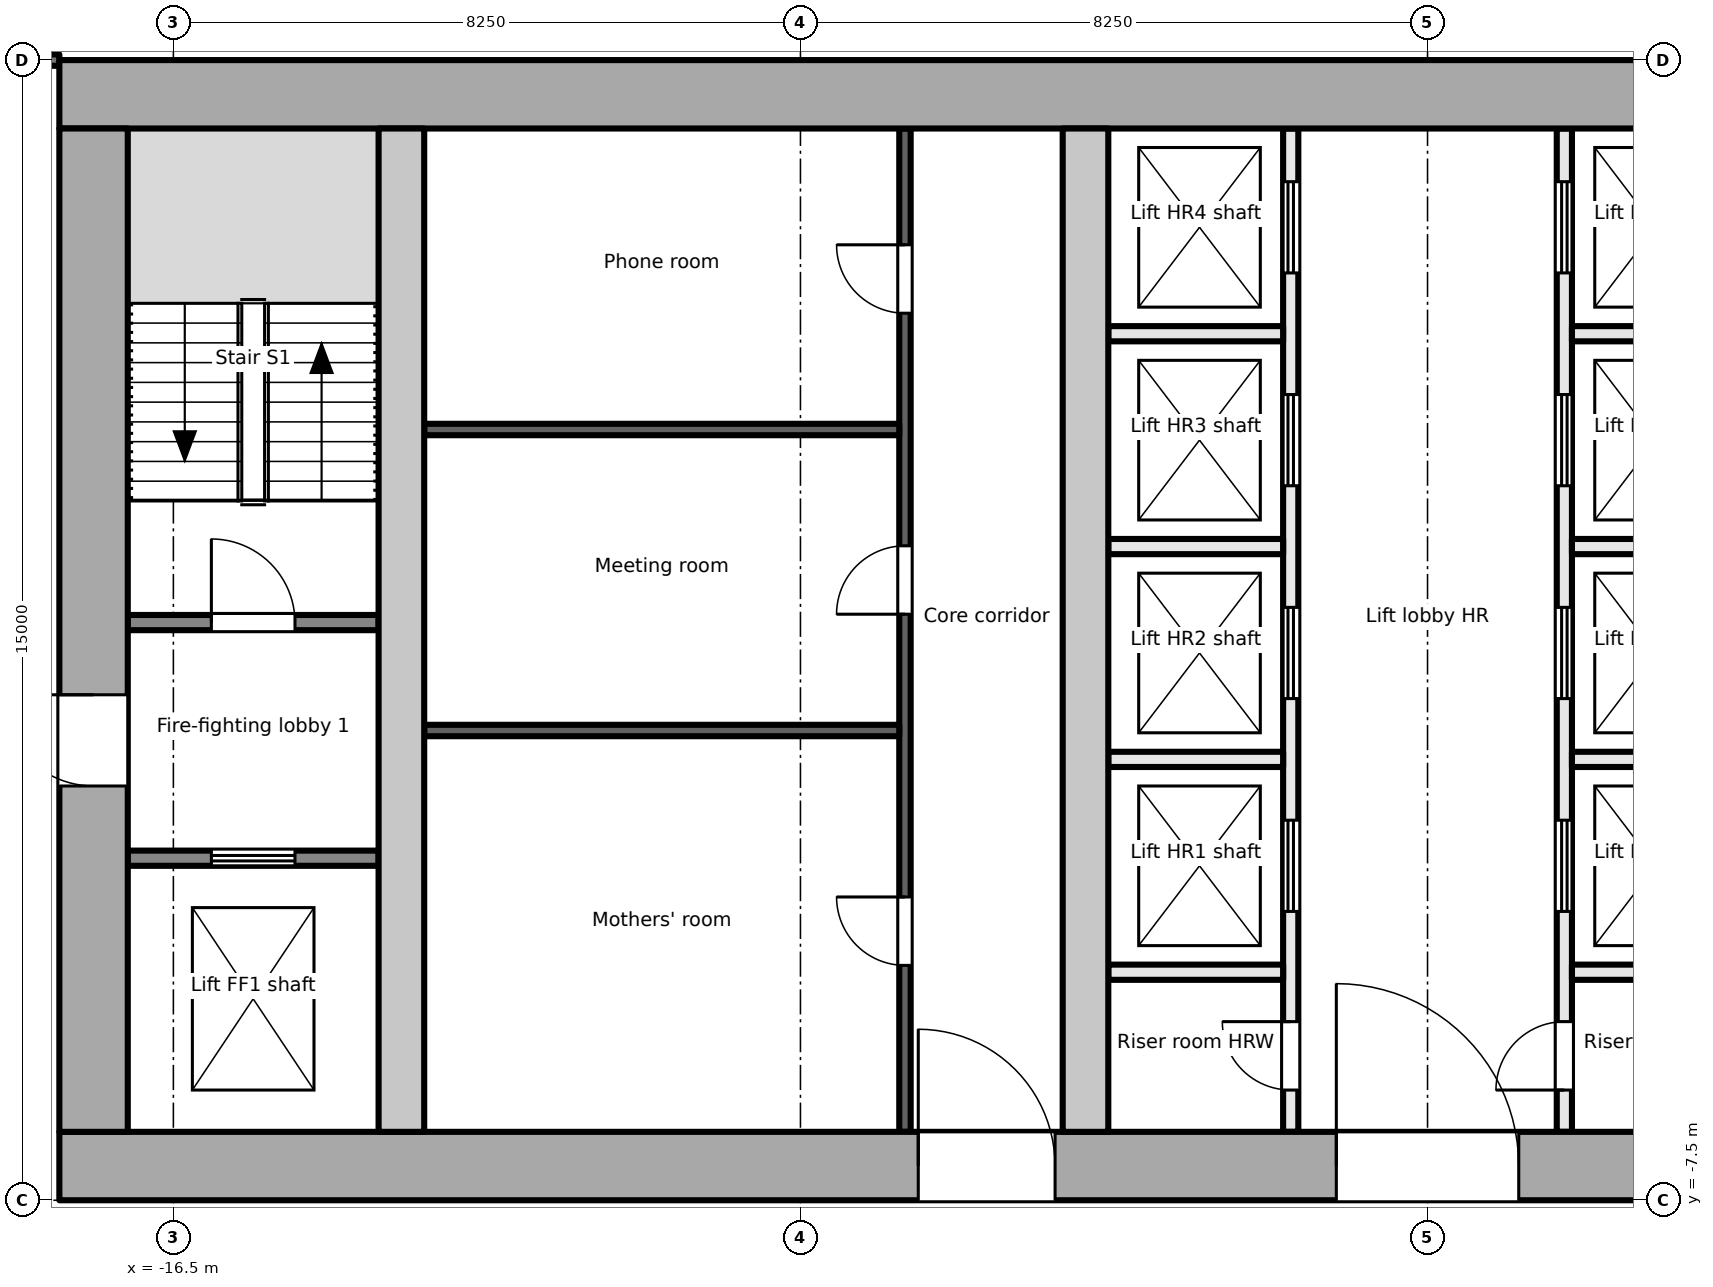
"""IFC4 building model, lengths in metres.
Left out: names, types, materials, properties, quantities, classifications, styles, units other than length and angle.
Written with IfcOpenShell. Run it as: python <this file> out.ifc"""

import sys

from ifc_helpers import new_model, si_unit, direction, frame, frame_2d, origin, place, context, subcontext, project, spatial, rectangle, extrude, element, fill, save


model = new_model("IFC4")
c1 = context("Model", 3, precision=1e-05, world=origin(), true_north=direction((0.0, 1.0)))
c2 = subcontext(c1, "Body", "Model", "MODEL_VIEW")
j1 = project(units=[si_unit("LENGTHUNIT", "METRE"), si_unit("PLANEANGLEUNIT", "RADIAN")], contexts=[c1])
p1 = place(None, origin())
s1 = spatial("IfcSite", under=j1, at=p1, CompositionType="ELEMENT")
p2 = place(p1, origin())
s2 = spatial("IfcBuilding", under=s1, at=p2, CompositionType="ELEMENT")
p3 = place(p2, frame((0.0, 0.0, 236.9)))
s3 = spatial("IfcBuildingStorey", under=s2, at=p3, CompositionType="ELEMENT", Elevation=236.9)
p4 = place(p3, frame((-18.0, -7.05, -0.2), z_axis=(0.0, 0.0, 1.0), x_axis=(1.0, 0.0, 0.0)))
e1 = element("IfcWall", 1, at=p4, inside=s3, PredefinedType="SHEAR", context=c2, shape_type="SweptSolid", body=[
    extrude(rectangle(XDim=36.0, YDim=0.9, at=frame_2d((18.0, 0.0))), origin(), (0.0, 0.0, 1.0), 3.9),
])
p5 = place(p4, frame((11.3, 0.0, 0.2)))
e2 = element("IfcOpeningElement", 2, at=p5, cuts=e1, PredefinedType="OPENING", context=c2, shape_type="SweptSolid", body=[
    extrude(rectangle(XDim=1.8, YDim=2.1, at=frame_2d((0.9, 1.05))), frame((0.0, 0.46, 0.0), z_axis=(0.0, -1.0, 0.0), x_axis=(1.0, 0.0, 0.0)), (0.0, 0.0, 1.0), 0.921),
])
p6 = place(p4, frame((16.8, 0.0, 0.2)))
e3 = element("IfcOpeningElement", 3, at=p6, cuts=e1, PredefinedType="OPENING", context=c2, shape_type="SweptSolid", body=[
    extrude(rectangle(XDim=2.4, YDim=2.1, at=frame_2d((1.2, 1.05))), frame((0.0, 0.46, 0.0), z_axis=(0.0, -1.0, 0.0), x_axis=(1.0, 0.0, 0.0)), (0.0, 0.0, 1.0), 0.921),
])
p7 = place(p4, frame((26.1, 0.0, 0.2)))
e4 = element("IfcOpeningElement", 4, at=p7, cuts=e1, PredefinedType="OPENING", context=c2, shape_type="SweptSolid", body=[
    extrude(rectangle(XDim=2.4, YDim=2.1, at=frame_2d((1.2, 1.05))), frame((0.0, 0.46, 0.0), z_axis=(0.0, -1.0, 0.0), x_axis=(1.0, 0.0, 0.0)), (0.0, 0.0, 1.0), 0.921),
])
p8 = place(p3, frame((-18.0, 7.05, -0.2), z_axis=(0.0, 0.0, 1.0), x_axis=(1.0, 0.0, 0.0)))
e5 = element("IfcWall", 5, at=p8, inside=s3, PredefinedType="SHEAR", context=c2, shape_type="SweptSolid", body=[
    extrude(rectangle(XDim=36.0, YDim=0.9, at=frame_2d((18.0, 0.0))), origin(), (0.0, 0.0, 1.0), 3.9),
])
p9 = place(p3, frame((-17.55, -6.6, -0.2), z_axis=(0.0, 0.0, 1.0), x_axis=(0.0, 1.0, 0.0)))
e6 = element("IfcWall", 6, at=p9, inside=s3, PredefinedType="SHEAR", context=c2, shape_type="SweptSolid", body=[
    extrude(rectangle(XDim=13.2, YDim=0.9, at=frame_2d((6.6, 0.0))), origin(), (0.0, 0.0, 1.0), 3.9),
])
p10 = place(p9, frame((4.55, 0.0, 0.2)))
e7 = element("IfcOpeningElement", 7, at=p10, cuts=e6, PredefinedType="OPENING", context=c2, shape_type="SweptSolid", body=[
    extrude(rectangle(XDim=1.2, YDim=2.1, at=frame_2d((0.6, 1.05))), frame((0.0, 0.46, 0.0), z_axis=(0.0, -1.0, 0.0), x_axis=(1.0, 0.0, 0.0)), (0.0, 0.0, 1.0), 0.921),
])
for number, where, z_axis, x_axis in (
    (8, (-13.5, -6.6, -0.2), (0.0, 0.0, 1.0), (0.0, 1.0, 0.0)),
    (9, (-4.5, -6.6, -0.2), (0.0, 0.0, 1.0), (0.0, 1.0, 0.0)),
):
    element("IfcWall", number, at=place(p3, frame(where, z_axis=z_axis, x_axis=x_axis)), inside=s3, PredefinedType="SHEAR", context=c2, shape_type="SweptSolid", body=[
        extrude(rectangle(XDim=13.2, YDim=0.6, at=frame_2d((6.6, 0.0))), origin(), (0.0, 0.0, 1.0), 3.9),
    ])
p11 = place(p3, frame((-17.1, -3.0, 0.0), z_axis=(0.0, 0.0, 1.0), x_axis=(1.0, 0.0, 0.0)))
e10 = element("IfcWall", 10, at=p11, inside=s3, PredefinedType="PARTITIONING", context=c2, shape_type="SweptSolid", body=[
    extrude(rectangle(XDim=3.3, YDim=0.2, at=frame_2d((1.65, 0.0))), origin(), (0.0, 0.0, 1.0), 3.7),
])
p12 = place(p11, frame((1.1, 0.0, 0.0)))
e11 = element("IfcOpeningElement", 11, at=p12, cuts=e10, PredefinedType="OPENING", context=c2, shape_type="SweptSolid", body=[
    extrude(rectangle(XDim=1.1, YDim=2.1, at=frame_2d((0.55, 1.05))), frame((0.0, 0.111, 0.0), z_axis=(0.0, -1.0, 0.0), x_axis=(1.0, 0.0, 0.0)), (0.0, 0.0, 1.0), 0.221),
])
p13 = place(p3, frame((-17.1, 0.1, 0.0), z_axis=(0.0, 0.0, 1.0), x_axis=(1.0, 0.0, 0.0)))
e12 = element("IfcWall", 12, at=p13, inside=s3, PredefinedType="PARTITIONING", context=c2, shape_type="SweptSolid", body=[
    extrude(rectangle(XDim=3.3, YDim=0.2, at=frame_2d((1.65, 0.0))), origin(), (0.0, 0.0, 1.0), 3.7),
])
p14 = place(p13, frame((1.1, 0.0, 0.0)))
e13 = element("IfcOpeningElement", 13, at=p14, cuts=e12, PredefinedType="OPENING", context=c2, shape_type="SweptSolid", body=[
    extrude(rectangle(XDim=1.1, YDim=2.1, at=frame_2d((0.55, 1.05))), frame((0.0, 0.111, 0.0), z_axis=(0.0, -1.0, 0.0), x_axis=(1.0, 0.0, 0.0)), (0.0, 0.0, 1.0), 0.221),
])
p15 = place(p3, frame((-6.875, -6.6, 0.0), z_axis=(0.0, 0.0, 1.0), x_axis=(0.0, 1.0, 0.0)))
e14 = element("IfcWall", 14, at=p15, inside=s3, PredefinedType="PARTITIONING", context=c2, shape_type="SweptSolid", body=[
    extrude(rectangle(XDim=13.2, YDim=0.15, at=frame_2d((6.6, 0.0))), origin(), (0.0, 0.0, 1.0), 3.7),
])
p16 = place(p15, frame((2.19, 0.0, 0.0)))
e15 = element("IfcOpeningElement", 15, at=p16, cuts=e14, PredefinedType="OPENING", context=c2, shape_type="SweptSolid", body=[
    extrude(rectangle(XDim=0.9, YDim=2.1, at=frame_2d((0.45, 1.05))), frame((0.0, 0.085, 0.0), z_axis=(0.0, -1.0, 0.0), x_axis=(1.0, 0.0, 0.0)), (0.0, 0.0, 1.0), 0.171),
])
p17 = place(p15, frame((6.81, 0.0, 0.0)))
e16 = element("IfcOpeningElement", 16, at=p17, cuts=e14, PredefinedType="OPENING", context=c2, shape_type="SweptSolid", body=[
    extrude(rectangle(XDim=0.9, YDim=2.1, at=frame_2d((0.45, 1.05))), frame((0.0, 0.085, 0.0), z_axis=(0.0, -1.0, 0.0), x_axis=(1.0, 0.0, 0.0)), (0.0, 0.0, 1.0), 0.171),
])
p18 = place(p15, frame((10.77, 0.0, 0.0)))
e17 = element("IfcOpeningElement", 17, at=p18, cuts=e14, PredefinedType="OPENING", context=c2, shape_type="SweptSolid", body=[
    extrude(rectangle(XDim=0.9, YDim=2.1, at=frame_2d((0.45, 1.05))), frame((0.0, 0.085, 0.0), z_axis=(0.0, -1.0, 0.0), x_axis=(1.0, 0.0, 0.0)), (0.0, 0.0, 1.0), 0.171),
])
for number, where, z_axis, x_axis in (
    (18, (-13.2, -1.32, 0.0), (0.0, 0.0, 1.0), (1.0, 0.0, 0.0)),
    (19, (-13.2, 2.64, 0.0), (0.0, 0.0, 1.0), (1.0, 0.0, 0.0)),
):
    element("IfcWall", number, at=place(p3, frame(where, z_axis=z_axis, x_axis=x_axis)), inside=s3, PredefinedType="PARTITIONING", context=c2, shape_type="SweptSolid", body=[
        extrude(rectangle(XDim=6.25, YDim=0.15, at=frame_2d((3.125, 0.0))), origin(), (0.0, 0.0, 1.0), 3.7),
    ])
p19 = place(p3, frame((-1.8, -6.6, 0.0), z_axis=(0.0, 0.0, 1.0), x_axis=(0.0, 1.0, 0.0)))
e20 = element("IfcWall", 20, at=p19, inside=s3, PredefinedType="PARTITIONING", context=c2, shape_type="SweptSolid", body=[
    extrude(rectangle(XDim=13.2, YDim=0.2, at=frame_2d((6.6, 0.0))), origin(), (0.0, 0.0, 1.0), 3.7),
])
p20 = place(p19, frame((0.55, 0.0, 0.0)))
e21 = element("IfcOpeningElement", 21, at=p20, cuts=e20, PredefinedType="OPENING", context=c2, shape_type="SweptSolid", body=[
    extrude(rectangle(XDim=0.9, YDim=2.1, at=frame_2d((0.45, 1.05))), frame((0.0, 0.111, 0.0), z_axis=(0.0, -1.0, 0.0), x_axis=(1.0, 0.0, 0.0)), (0.0, 0.0, 1.0), 0.221),
])
p21 = place(p19, frame((2.9, 0.0, 0.0)))
e22 = element("IfcOpeningElement", 22, at=p21, cuts=e20, PredefinedType="OPENING", context=c2, shape_type="SweptSolid", body=[
    extrude(rectangle(XDim=1.2, YDim=2.1, at=frame_2d((0.6, 1.05))), frame((0.0, 0.111, 0.0), z_axis=(0.0, -1.0, 0.0), x_axis=(1.0, 0.0, 0.0)), (0.0, 0.0, 1.0), 0.221),
])
p22 = place(p19, frame((5.7, 0.0, 0.0)))
e23 = element("IfcOpeningElement", 23, at=p22, cuts=e20, PredefinedType="OPENING", context=c2, shape_type="SweptSolid", body=[
    extrude(rectangle(XDim=1.2, YDim=2.1, at=frame_2d((0.6, 1.05))), frame((0.0, 0.111, 0.0), z_axis=(0.0, -1.0, 0.0), x_axis=(1.0, 0.0, 0.0)), (0.0, 0.0, 1.0), 0.221),
])
p23 = place(p19, frame((8.5, 0.0, 0.0)))
e24 = element("IfcOpeningElement", 24, at=p23, cuts=e20, PredefinedType="OPENING", context=c2, shape_type="SweptSolid", body=[
    extrude(rectangle(XDim=1.2, YDim=2.1, at=frame_2d((0.6, 1.05))), frame((0.0, 0.111, 0.0), z_axis=(0.0, -1.0, 0.0), x_axis=(1.0, 0.0, 0.0)), (0.0, 0.0, 1.0), 0.221),
])
p24 = place(p19, frame((11.3, 0.0, 0.0)))
e25 = element("IfcOpeningElement", 25, at=p24, cuts=e20, PredefinedType="OPENING", context=c2, shape_type="SweptSolid", body=[
    extrude(rectangle(XDim=1.2, YDim=2.1, at=frame_2d((0.6, 1.05))), frame((0.0, 0.111, 0.0), z_axis=(0.0, -1.0, 0.0), x_axis=(1.0, 0.0, 0.0)), (0.0, 0.0, 1.0), 0.221),
])
p25 = place(p3, frame((1.8, -6.6, 0.0), z_axis=(0.0, 0.0, 1.0), x_axis=(0.0, 1.0, 0.0)))
e26 = element("IfcWall", 26, at=p25, inside=s3, PredefinedType="PARTITIONING", context=c2, shape_type="SweptSolid", body=[
    extrude(rectangle(XDim=13.2, YDim=0.2, at=frame_2d((6.6, 0.0))), origin(), (0.0, 0.0, 1.0), 3.7),
])
p26 = place(p25, frame((0.55, 0.0, 0.0)))
e27 = element("IfcOpeningElement", 27, at=p26, cuts=e26, PredefinedType="OPENING", context=c2, shape_type="SweptSolid", body=[
    extrude(rectangle(XDim=0.9, YDim=2.1, at=frame_2d((0.45, 1.05))), frame((0.0, 0.111, 0.0), z_axis=(0.0, -1.0, 0.0), x_axis=(1.0, 0.0, 0.0)), (0.0, 0.0, 1.0), 0.221),
])
p27 = place(p25, frame((2.9, 0.0, 0.0)))
e28 = element("IfcOpeningElement", 28, at=p27, cuts=e26, PredefinedType="OPENING", context=c2, shape_type="SweptSolid", body=[
    extrude(rectangle(XDim=1.2, YDim=2.1, at=frame_2d((0.6, 1.05))), frame((0.0, 0.111, 0.0), z_axis=(0.0, -1.0, 0.0), x_axis=(1.0, 0.0, 0.0)), (0.0, 0.0, 1.0), 0.221),
])
p28 = place(p25, frame((5.7, 0.0, 0.0)))
e29 = element("IfcOpeningElement", 29, at=p28, cuts=e26, PredefinedType="OPENING", context=c2, shape_type="SweptSolid", body=[
    extrude(rectangle(XDim=1.2, YDim=2.1, at=frame_2d((0.6, 1.05))), frame((0.0, 0.111, 0.0), z_axis=(0.0, -1.0, 0.0), x_axis=(1.0, 0.0, 0.0)), (0.0, 0.0, 1.0), 0.221),
])
p29 = place(p25, frame((8.5, 0.0, 0.0)))
e30 = element("IfcOpeningElement", 30, at=p29, cuts=e26, PredefinedType="OPENING", context=c2, shape_type="SweptSolid", body=[
    extrude(rectangle(XDim=1.2, YDim=2.1, at=frame_2d((0.6, 1.05))), frame((0.0, 0.111, 0.0), z_axis=(0.0, -1.0, 0.0), x_axis=(1.0, 0.0, 0.0)), (0.0, 0.0, 1.0), 0.221),
])
p30 = place(p25, frame((11.3, 0.0, 0.0)))
e31 = element("IfcOpeningElement", 31, at=p30, cuts=e26, PredefinedType="OPENING", context=c2, shape_type="SweptSolid", body=[
    extrude(rectangle(XDim=1.2, YDim=2.1, at=frame_2d((0.6, 1.05))), frame((0.0, 0.111, 0.0), z_axis=(0.0, -1.0, 0.0), x_axis=(1.0, 0.0, 0.0)), (0.0, 0.0, 1.0), 0.221),
])
for number, where, z_axis, x_axis in (
    (32, (-4.2, -1.7, 0.0), (0.0, 0.0, 1.0), (1.0, 0.0, 0.0)),
    (33, (-4.2, 1.1, 0.0), (0.0, 0.0, 1.0), (1.0, 0.0, 0.0)),
    (34, (-4.2, 3.9, 0.0), (0.0, 0.0, 1.0), (1.0, 0.0, 0.0)),
    (35, (-4.2, -4.5, 0.0), (0.0, 0.0, 1.0), (1.0, 0.0, 0.0)),
    (36, (1.9, -1.7, 0.0), (0.0, 0.0, 1.0), (1.0, 0.0, 0.0)),
    (37, (1.9, 1.1, 0.0), (0.0, 0.0, 1.0), (1.0, 0.0, 0.0)),
    (38, (1.9, 3.9, 0.0), (0.0, 0.0, 1.0), (1.0, 0.0, 0.0)),
    (39, (1.9, -4.5, 0.0), (0.0, 0.0, 1.0), (1.0, 0.0, 0.0)),
):
    element("IfcWall", number, at=place(p3, frame(where, z_axis=z_axis, x_axis=x_axis)), inside=s3, PredefinedType="PARTITIONING", context=c2, shape_type="SweptSolid", body=[
        extrude(rectangle(XDim=2.3, YDim=0.2, at=frame_2d((1.15, 0.0))), origin(), (0.0, 0.0, 1.0), 3.7),
    ])
p31 = place(p3, frame((-20.431, 7.5, 0.0), z_axis=(0.0, 0.0, 1.0), x_axis=(1.0, 0.0, 0.0)))
e40 = element("IfcWall", 40, at=p31, inside=s3, PredefinedType="PARTITIONING", context=c2, shape_type="SweptSolid", body=[
    extrude(rectangle(XDim=2.431, YDim=0.15, at=frame_2d((1.215, 0.0))), origin(), (0.0, 0.0, 1.0), 3.7),
])
p32 = place(p12, origin())
e41 = element("IfcDoor", 41, at=p32, inside=s3, OperationType="DOUBLE_DOOR_SLIDING", PredefinedType="DOOR", context=c2, shape_type="SweptSolid", body=[
    extrude(rectangle(XDim=1.1, YDim=2.1, at=frame_2d((0.55, 1.05))), frame((0.0, 0.025, 0.0), z_axis=(0.0, -1.0, 0.0), x_axis=(1.0, 0.0, 0.0)), (0.0, 0.0, 1.0), 0.05),
])
fill(e11, e41)
p33 = place(p10, origin())
e42 = element("IfcDoor", 42, at=p33, inside=s3, OperationType="SINGLE_SWING_RIGHT", PredefinedType="DOOR", context=c2, shape_type="SweptSolid", body=[
    extrude(rectangle(XDim=1.2, YDim=2.1, at=frame_2d((0.6, 1.05))), frame((0.0, 0.025, 0.0), z_axis=(0.0, -1.0, 0.0), x_axis=(1.0, 0.0, 0.0)), (0.0, 0.0, 1.0), 0.05),
])
fill(e7, e42)
p34 = place(p14, origin())
e43 = element("IfcDoor", 43, at=p34, inside=s3, OperationType="SINGLE_SWING_LEFT", PredefinedType="DOOR", context=c2, shape_type="SweptSolid", body=[
    extrude(rectangle(XDim=1.1, YDim=2.1, at=frame_2d((0.55, 1.05))), frame((0.0, 0.025, 0.0), z_axis=(0.0, -1.0, 0.0), x_axis=(1.0, 0.0, 0.0)), (0.0, 0.0, 1.0), 0.05),
])
fill(e13, e43)
p35 = place(p16, origin())
e44 = element("IfcDoor", 44, at=p35, inside=s3, OperationType="SINGLE_SWING_RIGHT", PredefinedType="DOOR", context=c2, shape_type="SweptSolid", body=[
    extrude(rectangle(XDim=0.9, YDim=2.1, at=frame_2d((0.45, 1.05))), frame((0.0, 0.025, 0.0), z_axis=(0.0, -1.0, 0.0), x_axis=(1.0, 0.0, 0.0)), (0.0, 0.0, 1.0), 0.05),
])
fill(e15, e44)
p36 = place(p17, origin())
e45 = element("IfcDoor", 45, at=p36, inside=s3, OperationType="SINGLE_SWING_LEFT", PredefinedType="DOOR", context=c2, shape_type="SweptSolid", body=[
    extrude(rectangle(XDim=0.9, YDim=2.1, at=frame_2d((0.45, 1.05))), frame((0.0, 0.025, 0.0), z_axis=(0.0, -1.0, 0.0), x_axis=(1.0, 0.0, 0.0)), (0.0, 0.0, 1.0), 0.05),
])
fill(e16, e45)
p37 = place(p18, origin())
e46 = element("IfcDoor", 46, at=p37, inside=s3, OperationType="SINGLE_SWING_RIGHT", PredefinedType="DOOR", context=c2, shape_type="SweptSolid", body=[
    extrude(rectangle(XDim=0.9, YDim=2.1, at=frame_2d((0.45, 1.05))), frame((0.0, 0.025, 0.0), z_axis=(0.0, -1.0, 0.0), x_axis=(1.0, 0.0, 0.0)), (0.0, 0.0, 1.0), 0.05),
])
fill(e17, e46)
p38 = place(p5, origin())
e47 = element("IfcDoor", 47, at=p38, inside=s3, OperationType="SINGLE_SWING_LEFT", PredefinedType="DOOR", context=c2, shape_type="SweptSolid", body=[
    extrude(rectangle(XDim=1.8, YDim=2.1, at=frame_2d((0.9, 1.05))), frame((0.0, 0.025, 0.0), z_axis=(0.0, -1.0, 0.0), x_axis=(1.0, 0.0, 0.0)), (0.0, 0.0, 1.0), 0.05),
])
fill(e2, e47)
p39 = place(p20, origin())
e48 = element("IfcDoor", 48, at=p39, inside=s3, OperationType="SINGLE_SWING_RIGHT", PredefinedType="DOOR", context=c2, shape_type="SweptSolid", body=[
    extrude(rectangle(XDim=0.9, YDim=2.1, at=frame_2d((0.45, 1.05))), frame((0.0, 0.025, 0.0), z_axis=(0.0, -1.0, 0.0), x_axis=(1.0, 0.0, 0.0)), (0.0, 0.0, 1.0), 0.05),
])
fill(e21, e48)
p40 = place(p21, origin())
e49 = element("IfcDoor", 49, at=p40, inside=s3, OperationType="DOUBLE_DOOR_SLIDING", PredefinedType="DOOR", context=c2, shape_type="SweptSolid", body=[
    extrude(rectangle(XDim=1.2, YDim=2.1, at=frame_2d((0.6, 1.05))), frame((0.0, 0.025, 0.0), z_axis=(0.0, -1.0, 0.0), x_axis=(1.0, 0.0, 0.0)), (0.0, 0.0, 1.0), 0.05),
])
fill(e22, e49)
p41 = place(p22, origin())
e50 = element("IfcDoor", 50, at=p41, inside=s3, OperationType="DOUBLE_DOOR_SLIDING", PredefinedType="DOOR", context=c2, shape_type="SweptSolid", body=[
    extrude(rectangle(XDim=1.2, YDim=2.1, at=frame_2d((0.6, 1.05))), frame((0.0, 0.025, 0.0), z_axis=(0.0, -1.0, 0.0), x_axis=(1.0, 0.0, 0.0)), (0.0, 0.0, 1.0), 0.05),
])
fill(e23, e50)
p42 = place(p23, origin())
e51 = element("IfcDoor", 51, at=p42, inside=s3, OperationType="DOUBLE_DOOR_SLIDING", PredefinedType="DOOR", context=c2, shape_type="SweptSolid", body=[
    extrude(rectangle(XDim=1.2, YDim=2.1, at=frame_2d((0.6, 1.05))), frame((0.0, 0.025, 0.0), z_axis=(0.0, -1.0, 0.0), x_axis=(1.0, 0.0, 0.0)), (0.0, 0.0, 1.0), 0.05),
])
fill(e24, e51)
p43 = place(p24, origin())
e52 = element("IfcDoor", 52, at=p43, inside=s3, OperationType="DOUBLE_DOOR_SLIDING", PredefinedType="DOOR", context=c2, shape_type="SweptSolid", body=[
    extrude(rectangle(XDim=1.2, YDim=2.1, at=frame_2d((0.6, 1.05))), frame((0.0, 0.025, 0.0), z_axis=(0.0, -1.0, 0.0), x_axis=(1.0, 0.0, 0.0)), (0.0, 0.0, 1.0), 0.05),
])
fill(e25, e52)
p44 = place(p26, origin())
e53 = element("IfcDoor", 53, at=p44, inside=s3, OperationType="SINGLE_SWING_LEFT", PredefinedType="DOOR", context=c2, shape_type="SweptSolid", body=[
    extrude(rectangle(XDim=0.9, YDim=2.1, at=frame_2d((0.45, 1.05))), frame((0.0, 0.025, 0.0), z_axis=(0.0, -1.0, 0.0), x_axis=(1.0, 0.0, 0.0)), (0.0, 0.0, 1.0), 0.05),
])
fill(e27, e53)
p45 = place(p27, origin())
e54 = element("IfcDoor", 54, at=p45, inside=s3, OperationType="DOUBLE_DOOR_SLIDING", PredefinedType="DOOR", context=c2, shape_type="SweptSolid", body=[
    extrude(rectangle(XDim=1.2, YDim=2.1, at=frame_2d((0.6, 1.05))), frame((0.0, 0.025, 0.0), z_axis=(0.0, -1.0, 0.0), x_axis=(1.0, 0.0, 0.0)), (0.0, 0.0, 1.0), 0.05),
])
fill(e28, e54)
p46 = place(p28, origin())
e55 = element("IfcDoor", 55, at=p46, inside=s3, OperationType="DOUBLE_DOOR_SLIDING", PredefinedType="DOOR", context=c2, shape_type="SweptSolid", body=[
    extrude(rectangle(XDim=1.2, YDim=2.1, at=frame_2d((0.6, 1.05))), frame((0.0, 0.025, 0.0), z_axis=(0.0, -1.0, 0.0), x_axis=(1.0, 0.0, 0.0)), (0.0, 0.0, 1.0), 0.05),
])
fill(e29, e55)
p47 = place(p29, origin())
e56 = element("IfcDoor", 56, at=p47, inside=s3, OperationType="DOUBLE_DOOR_SLIDING", PredefinedType="DOOR", context=c2, shape_type="SweptSolid", body=[
    extrude(rectangle(XDim=1.2, YDim=2.1, at=frame_2d((0.6, 1.05))), frame((0.0, 0.025, 0.0), z_axis=(0.0, -1.0, 0.0), x_axis=(1.0, 0.0, 0.0)), (0.0, 0.0, 1.0), 0.05),
])
fill(e30, e56)
p48 = place(p30, origin())
e57 = element("IfcDoor", 57, at=p48, inside=s3, OperationType="DOUBLE_DOOR_SLIDING", PredefinedType="DOOR", context=c2, shape_type="SweptSolid", body=[
    extrude(rectangle(XDim=1.2, YDim=2.1, at=frame_2d((0.6, 1.05))), frame((0.0, 0.025, 0.0), z_axis=(0.0, -1.0, 0.0), x_axis=(1.0, 0.0, 0.0)), (0.0, 0.0, 1.0), 0.05),
])
fill(e31, e57)
p49 = place(p6, origin())
e58 = element("IfcDoor", 58, at=p49, inside=s3, OperationType="DOUBLE_DOOR_DOUBLE_SWING", PredefinedType="DOOR", context=c2, shape_type="SweptSolid", body=[
    extrude(rectangle(XDim=2.4, YDim=2.1, at=frame_2d((1.2, 1.05))), frame((0.0, 0.025, 0.0), z_axis=(0.0, -1.0, 0.0), x_axis=(1.0, 0.0, 0.0)), (0.0, 0.0, 1.0), 0.05),
])
fill(e3, e58)
save(model, sys.argv[1])
